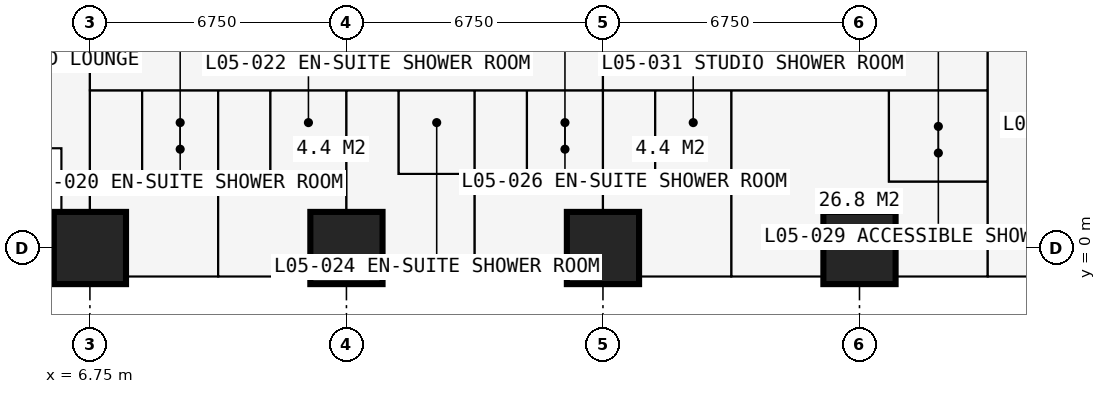
"""IFC4 building model, lengths in metres.
Left out: names, types, materials, properties, quantities, classifications, styles, units other than length and angle.
Written with IfcOpenShell. Run it as: python <this file> out.ifc"""

import sys

from ifc_helpers import new_model, si_unit, direction, frame, frame_2d, origin, origin_2d, place, context, subcontext, project, spatial, rectangle, extrude, element, fill, save


model = new_model("IFC4")
c1 = context("Model", 3, precision=1e-05, world=origin(), true_north=direction((0.0, 1.0)))
c2 = subcontext(c1, "Body", "Model", "MODEL_VIEW")
j1 = project(units=[si_unit("LENGTHUNIT", "METRE"), si_unit("PLANEANGLEUNIT", "RADIAN")], contexts=[c1])
p1 = place(None, origin())
s1 = spatial("IfcSite", under=j1, at=p1, CompositionType="ELEMENT")
p2 = place(p1, origin())
s2 = spatial("IfcBuilding", under=s1, at=p2, CompositionType="ELEMENT")
p3 = place(p2, frame((0.0, 0.0, 21.6)))
s3 = spatial("IfcBuildingStorey", under=s2, at=p3, CompositionType="ELEMENT", Elevation=21.6)
for number, where, z_axis, x_axis in (
    (1, (6.75, 0.0, 0.0), (0.0, 0.0, 1.0), (1.0, 0.0, 0.0)),
    (2, (13.5, 0.0, 0.0), (0.0, 0.0, 1.0), (1.0, 0.0, 0.0)),
    (3, (20.25, 0.0, 0.0), (0.0, 0.0, 1.0), (1.0, 0.0, 0.0)),
    (4, (27.0, 0.0, 0.0), (0.0, 0.0, 1.0), (1.0, 0.0, 0.0)),
):
    element("IfcColumn", number, at=place(p3, frame(where, z_axis=z_axis, x_axis=x_axis)), inside=s3, PredefinedType="COLUMN", context=c2, shape_type="SweptSolid", body=[
        extrude(rectangle(XDim=1.9, YDim=1.9, at=origin_2d()), origin(), (0.0, 0.0, 1.0), 3.6),
    ])
p4 = place(p3, frame((2.625, 2.625, 0.0), z_axis=(0.0, 0.0, 1.0), x_axis=(1.0, 0.0, 0.0)))
e5 = element("IfcWall", 5, at=p4, inside=s3, PredefinedType="SOLIDWALL", context=c2, shape_type="SweptSolid", body=[
    extrude(rectangle(XDim=3.375, YDim=0.3, at=frame_2d((1.688, 0.0))), origin(), (0.0, 0.0, 1.0), 3.375),
])
p5 = place(p4, frame((0.788, 0.0, 0.6)))
e6 = element("IfcOpeningElement", 6, at=p5, cuts=e5, PredefinedType="OPENING", context=c2, shape_type="SweptSolid", body=[
    extrude(rectangle(XDim=1.8, YDim=2.1, at=frame_2d((0.9, 1.05))), frame((0.0, 0.16, 0.0), z_axis=(0.0, -1.0, 0.0), x_axis=(1.0, 0.0, 0.0)), (0.0, 0.0, 1.0), 0.32),
])
p6 = place(p3, frame((6.0, 2.625, 0.0), z_axis=(0.0, 0.0, 1.0), x_axis=(0.0, -1.0, 0.0)))
e7 = element("IfcWall", 7, at=p6, inside=s3, PredefinedType="SOLIDWALL", context=c2, shape_type="SweptSolid", body=[
    extrude(rectangle(XDim=3.375, YDim=0.3, at=frame_2d((1.688, 0.0))), origin(), (0.0, 0.0, 1.0), 3.375),
])
p7 = place(p6, frame((0.317, 0.0, 0.9)))
e8 = element("IfcOpeningElement", 8, at=p7, cuts=e7, PredefinedType="OPENING", context=c2, shape_type="SweptSolid", body=[
    extrude(rectangle(XDim=1.2, YDim=1.8, at=frame_2d((0.6, 0.9))), frame((0.0, 0.16, 0.0), z_axis=(0.0, -1.0, 0.0), x_axis=(1.0, 0.0, 0.0)), (0.0, 0.0, 1.0), 0.32),
])
p8 = place(p3, frame((27.0, -0.75, 0.0), z_axis=(0.0, 0.0, 1.0), x_axis=(-1.0, 0.0, 0.0)))
e9 = element("IfcWall", 9, at=p8, inside=s3, PredefinedType="SOLIDWALL", context=c2, shape_type="SweptSolid", body=[
    extrude(rectangle(XDim=6.75, YDim=0.15, at=frame_2d((3.375, 0.0))), origin(), (0.0, 0.0, 1.0), 3.375),
])
p9 = place(p8, frame((0.996, 0.0, 0.0)))
e10 = element("IfcOpeningElement", 10, at=p9, cuts=e9, PredefinedType="OPENING", context=c2, shape_type="SweptSolid", body=[
    extrude(rectangle(XDim=1.0, YDim=2.2, at=frame_2d((0.5, 1.1))), frame((0.0, 0.085, 0.0), z_axis=(0.0, -1.0, 0.0), x_axis=(1.0, 0.0, 0.0)), (0.0, 0.0, 1.0), 0.17),
])
p10 = place(p8, frame((2.042, 0.0, 0.9)))
e11 = element("IfcOpeningElement", 11, at=p10, cuts=e9, PredefinedType="OPENING", context=c2, shape_type="SweptSolid", body=[
    extrude(rectangle(XDim=1.2, YDim=1.8, at=frame_2d((0.6, 0.9))), frame((0.0, 0.085, 0.0), z_axis=(0.0, -1.0, 0.0), x_axis=(1.0, 0.0, 0.0)), (0.0, 0.0, 1.0), 0.17),
])
p11 = place(p8, frame((4.754, 0.0, 0.0)))
e12 = element("IfcOpeningElement", 12, at=p11, cuts=e9, PredefinedType="OPENING", context=c2, shape_type="SweptSolid", body=[
    extrude(rectangle(XDim=1.0, YDim=2.2, at=frame_2d((0.5, 1.1))), frame((0.0, 0.085, 0.0), z_axis=(0.0, -1.0, 0.0), x_axis=(1.0, 0.0, 0.0)), (0.0, 0.0, 1.0), 0.17),
])
p12 = place(p8, frame((3.508, 0.0, 0.9)))
e13 = element("IfcOpeningElement", 13, at=p12, cuts=e9, PredefinedType="OPENING", context=c2, shape_type="SweptSolid", body=[
    extrude(rectangle(XDim=1.2, YDim=1.8, at=frame_2d((0.6, 0.9))), frame((0.0, 0.085, 0.0), z_axis=(0.0, -1.0, 0.0), x_axis=(1.0, 0.0, 0.0)), (0.0, 0.0, 1.0), 0.17),
])
p13 = place(p3, frame((23.625, -0.85, 0.0), z_axis=(0.0, 0.0, 1.0), x_axis=(0.0, -1.0, 0.0)))
e14 = element("IfcWall", 14, at=p13, inside=s3, PredefinedType="USERDEFINED", context=c2, shape_type="SweptSolid", body=[
    extrude(rectangle(XDim=2.2, YDim=1.0, at=frame_2d((1.1, 0.0))), origin(), (0.0, 0.0, 1.0), 0.9),
])
p14 = place(p3, frame((6.75, -0.734, 0.0), z_axis=(0.0, 0.0, 1.0), x_axis=(0.0, 1.0, 0.0)))
e15 = element("IfcWall", 15, at=p14, inside=s3, PredefinedType="PARTITIONING", context=c2, shape_type="SweptSolid", body=[
    extrude(rectangle(XDim=10.859, YDim=0.15, at=frame_2d((5.429, 0.0))), origin(), (0.0, 0.0, 1.0), 2.877),
])
p15 = place(p3, frame((6.75, 4.15, 0.0), z_axis=(0.0, 0.0, 1.0), x_axis=(1.0, 0.0, 0.0)))
e16 = element("IfcWall", 16, at=p15, inside=s3, PredefinedType="PARTITIONING", context=c2, shape_type="SweptSolid", body=[
    extrude(rectangle(XDim=23.625, YDim=0.1, at=frame_2d((11.812, 0.0))), origin(), (0.0, 0.0, 1.0), 3.375),
])
p16 = place(p15, frame((0.2, 0.0, 0.0)))
e17 = element("IfcOpeningElement", 17, at=p16, cuts=e16, PredefinedType="OPENING", context=c2, shape_type="SweptSolid", body=[
    extrude(rectangle(XDim=0.95, YDim=2.2, at=frame_2d((0.475, 1.1))), frame((0.0, 0.06, 0.0), z_axis=(0.0, -1.0, 0.0), x_axis=(1.0, 0.0, 0.0)), (0.0, 0.0, 1.0), 0.12),
])
p17 = place(p15, frame((3.625, 0.0, 0.0)))
e18 = element("IfcOpeningElement", 18, at=p17, cuts=e16, PredefinedType="OPENING", context=c2, shape_type="SweptSolid", body=[
    extrude(rectangle(XDim=0.95, YDim=2.2, at=frame_2d((0.475, 1.1))), frame((0.0, 0.06, 0.0), z_axis=(0.0, -1.0, 0.0), x_axis=(1.0, 0.0, 0.0)), (0.0, 0.0, 1.0), 0.12),
])
p18 = place(p15, frame((7.0, 0.0, 0.0)))
e19 = element("IfcOpeningElement", 19, at=p18, cuts=e16, PredefinedType="OPENING", context=c2, shape_type="SweptSolid", body=[
    extrude(rectangle(XDim=0.95, YDim=2.2, at=frame_2d((0.475, 1.1))), frame((0.0, 0.06, 0.0), z_axis=(0.0, -1.0, 0.0), x_axis=(1.0, 0.0, 0.0)), (0.0, 0.0, 1.0), 0.12),
])
p19 = place(p15, frame((10.375, 0.0, 0.0)))
e20 = element("IfcOpeningElement", 20, at=p19, cuts=e16, PredefinedType="OPENING", context=c2, shape_type="SweptSolid", body=[
    extrude(rectangle(XDim=0.95, YDim=2.2, at=frame_2d((0.475, 1.1))), frame((0.0, 0.06, 0.0), z_axis=(0.0, -1.0, 0.0), x_axis=(1.0, 0.0, 0.0)), (0.0, 0.0, 1.0), 0.12),
])
p20 = place(p15, frame((18.475, 0.0, 0.0)))
e21 = element("IfcOpeningElement", 21, at=p20, cuts=e16, PredefinedType="OPENING", context=c2, shape_type="SweptSolid", body=[
    extrude(rectangle(XDim=0.95, YDim=2.2, at=frame_2d((0.475, 1.1))), frame((0.0, 0.06, 0.0), z_axis=(0.0, -1.0, 0.0), x_axis=(1.0, 0.0, 0.0)), (0.0, 0.0, 1.0), 0.12),
])
p21 = place(p15, frame((13.7, 0.0, 0.0)))
e22 = element("IfcOpeningElement", 22, at=p21, cuts=e16, PredefinedType="OPENING", context=c2, shape_type="SweptSolid", body=[
    extrude(rectangle(XDim=0.95, YDim=2.2, at=frame_2d((0.475, 1.1))), frame((0.0, 0.06, 0.0), z_axis=(0.0, -1.0, 0.0), x_axis=(1.0, 0.0, 0.0)), (0.0, 0.0, 1.0), 0.12),
])
p22 = place(p3, frame((8.125, 1.95, 0.0), z_axis=(0.0, 0.0, 1.0), x_axis=(0.0, 1.0, 0.0)))
e23 = element("IfcWall", 23, at=p22, inside=s3, PredefinedType="PARTITIONING", context=c2, shape_type="SweptSolid", body=[
    extrude(rectangle(XDim=2.2, YDim=0.1, at=frame_2d((1.1, 0.0))), origin(), (0.0, 0.0, 1.0), 3.375),
])
p23 = place(p22, frame((0.65, 0.0, 0.0)))
e24 = element("IfcOpeningElement", 24, at=p23, cuts=e23, PredefinedType="OPENING", context=c2, shape_type="SweptSolid", body=[
    extrude(rectangle(XDim=0.9, YDim=2.2, at=frame_2d((0.45, 1.1))), frame((0.0, 0.06, 0.0), z_axis=(0.0, -1.0, 0.0), x_axis=(1.0, 0.0, 0.0)), (0.0, 0.0, 1.0), 0.12),
])
p24 = place(p3, frame((8.125, 1.95, 0.0), z_axis=(0.0, 0.0, 1.0), x_axis=(1.0, 0.0, 0.0)))
e25 = element("IfcWall", 25, at=p24, inside=s3, PredefinedType="PARTITIONING", context=c2, shape_type="SweptSolid", body=[
    extrude(rectangle(XDim=2.0, YDim=0.1, at=frame_2d((1.0, 0.0))), origin(), (0.0, 0.0, 1.0), 3.375),
])
p25 = place(p3, frame((10.125, -0.734, 0.0), z_axis=(0.0, 0.0, 1.0), x_axis=(0.0, 1.0, 0.0)))
e26 = element("IfcWall", 26, at=p25, inside=s3, PredefinedType="PARTITIONING", context=c2, shape_type="SweptSolid", body=[
    extrude(rectangle(XDim=4.884, YDim=0.175, at=frame_2d((2.442, 0.0))), origin(), (0.0, 0.0, 1.0), 3.375),
])
p26 = place(p3, frame((11.5, 1.95, 0.0), z_axis=(0.0, 0.0, 1.0), x_axis=(0.0, 1.0, 0.0)))
e27 = element("IfcWall", 27, at=p26, inside=s3, PredefinedType="PARTITIONING", context=c2, shape_type="SweptSolid", body=[
    extrude(rectangle(XDim=2.2, YDim=0.1, at=frame_2d((1.1, 0.0))), origin(), (0.0, 0.0, 1.0), 3.375),
])
p27 = place(p26, frame((0.65, 0.0, 0.0)))
e28 = element("IfcOpeningElement", 28, at=p27, cuts=e27, PredefinedType="OPENING", context=c2, shape_type="SweptSolid", body=[
    extrude(rectangle(XDim=0.9, YDim=2.2, at=frame_2d((0.45, 1.1))), frame((0.0, 0.06, 0.0), z_axis=(0.0, -1.0, 0.0), x_axis=(1.0, 0.0, 0.0)), (0.0, 0.0, 1.0), 0.12),
])
p28 = place(p3, frame((11.5, 1.95, 0.0), z_axis=(0.0, 0.0, 1.0), x_axis=(1.0, 0.0, 0.0)))
e29 = element("IfcWall", 29, at=p28, inside=s3, PredefinedType="PARTITIONING", context=c2, shape_type="SweptSolid", body=[
    extrude(rectangle(XDim=2.0, YDim=0.1, at=frame_2d((1.0, 0.0))), origin(), (0.0, 0.0, 1.0), 3.375),
])
p29 = place(p3, frame((13.5, -0.734, 0.0), z_axis=(0.0, 0.0, 1.0), x_axis=(0.0, 1.0, 0.0)))
e30 = element("IfcWall", 30, at=p29, inside=s3, PredefinedType="PARTITIONING", context=c2, shape_type="SweptSolid", body=[
    extrude(rectangle(XDim=4.884, YDim=0.175, at=frame_2d((2.442, 0.0))), origin(), (0.0, 0.0, 1.0), 2.61),
])
p30 = place(p3, frame((14.875, 1.95, 0.0), z_axis=(0.0, 0.0, 1.0), x_axis=(0.0, 1.0, 0.0)))
e31 = element("IfcWall", 31, at=p30, inside=s3, PredefinedType="PARTITIONING", context=c2, shape_type="SweptSolid", body=[
    extrude(rectangle(XDim=2.2, YDim=0.1, at=frame_2d((1.1, 0.0))), origin(), (0.0, 0.0, 1.0), 3.375),
])
p31 = place(p30, frame((0.65, 0.0, 0.0)))
e32 = element("IfcOpeningElement", 32, at=p31, cuts=e31, PredefinedType="OPENING", context=c2, shape_type="SweptSolid", body=[
    extrude(rectangle(XDim=0.9, YDim=2.2, at=frame_2d((0.45, 1.1))), frame((0.0, 0.06, 0.0), z_axis=(0.0, -1.0, 0.0), x_axis=(1.0, 0.0, 0.0)), (0.0, 0.0, 1.0), 0.12),
])
p32 = place(p3, frame((14.875, 1.95, 0.0), z_axis=(0.0, 0.0, 1.0), x_axis=(1.0, 0.0, 0.0)))
e33 = element("IfcWall", 33, at=p32, inside=s3, PredefinedType="PARTITIONING", context=c2, shape_type="SweptSolid", body=[
    extrude(rectangle(XDim=2.0, YDim=0.1, at=frame_2d((1.0, 0.0))), origin(), (0.0, 0.0, 1.0), 3.375),
])
p33 = place(p3, frame((16.875, -0.734, 0.0), z_axis=(0.0, 0.0, 1.0), x_axis=(0.0, 1.0, 0.0)))
e34 = element("IfcWall", 34, at=p33, inside=s3, PredefinedType="PARTITIONING", context=c2, shape_type="SweptSolid", body=[
    extrude(rectangle(XDim=4.884, YDim=0.175, at=frame_2d((2.442, 0.0))), origin(), (0.0, 0.0, 1.0), 3.375),
])
p34 = place(p3, frame((18.25, 1.95, 0.0), z_axis=(0.0, 0.0, 1.0), x_axis=(0.0, 1.0, 0.0)))
e35 = element("IfcWall", 35, at=p34, inside=s3, PredefinedType="PARTITIONING", context=c2, shape_type="SweptSolid", body=[
    extrude(rectangle(XDim=2.2, YDim=0.1, at=frame_2d((1.1, 0.0))), origin(), (0.0, 0.0, 1.0), 3.375),
])
p35 = place(p34, frame((0.65, 0.0, 0.0)))
e36 = element("IfcOpeningElement", 36, at=p35, cuts=e35, PredefinedType="OPENING", context=c2, shape_type="SweptSolid", body=[
    extrude(rectangle(XDim=0.9, YDim=2.2, at=frame_2d((0.45, 1.1))), frame((0.0, 0.06, 0.0), z_axis=(0.0, -1.0, 0.0), x_axis=(1.0, 0.0, 0.0)), (0.0, 0.0, 1.0), 0.12),
])
p36 = place(p3, frame((18.25, 1.95, 0.0), z_axis=(0.0, 0.0, 1.0), x_axis=(1.0, 0.0, 0.0)))
e37 = element("IfcWall", 37, at=p36, inside=s3, PredefinedType="PARTITIONING", context=c2, shape_type="SweptSolid", body=[
    extrude(rectangle(XDim=2.0, YDim=0.1, at=frame_2d((1.0, 0.0))), origin(), (0.0, 0.0, 1.0), 3.375),
])
p37 = place(p3, frame((20.25, -0.734, 0.0), z_axis=(0.0, 0.0, 1.0), x_axis=(0.0, 1.0, 0.0)))
e38 = element("IfcWall", 38, at=p37, inside=s3, PredefinedType="PARTITIONING", context=c2, shape_type="SweptSolid", body=[
    extrude(rectangle(XDim=12.034, YDim=0.15, at=frame_2d((6.017, 0.0))), origin(), (0.0, 0.0, 1.0), 2.61),
])
p38 = place(p3, frame((21.625, 1.95, 0.0), z_axis=(0.0, 0.0, 1.0), x_axis=(0.0, 1.0, 0.0)))
e39 = element("IfcWall", 39, at=p38, inside=s3, PredefinedType="PARTITIONING", context=c2, shape_type="SweptSolid", body=[
    extrude(rectangle(XDim=2.2, YDim=0.1, at=frame_2d((1.1, 0.0))), origin(), (0.0, 0.0, 1.0), 3.375),
])
p39 = place(p3, frame((21.625, 1.95, 0.0), z_axis=(0.0, 0.0, 1.0), x_axis=(1.0, 0.0, 0.0)))
e40 = element("IfcWall", 40, at=p39, inside=s3, PredefinedType="PARTITIONING", context=c2, shape_type="SweptSolid", body=[
    extrude(rectangle(XDim=2.0, YDim=0.1, at=frame_2d((1.0, 0.0))), origin(), (0.0, 0.0, 1.0), 3.375),
])
p40 = place(p3, frame((23.625, -0.734, 0.0), z_axis=(0.0, 0.0, 1.0), x_axis=(0.0, 1.0, 0.0)))
e41 = element("IfcWall", 41, at=p40, inside=s3, PredefinedType="PARTITIONING", context=c2, shape_type="SweptSolid", body=[
    extrude(rectangle(XDim=4.884, YDim=0.175, at=frame_2d((2.442, 0.0))), origin(), (0.0, 0.0, 1.0), 3.375),
])
p41 = place(p40, frame((3.334, 0.0, 0.0)))
e42 = element("IfcOpeningElement", 42, at=p41, cuts=e41, PredefinedType="OPENING", context=c2, shape_type="SweptSolid", body=[
    extrude(rectangle(XDim=0.9, YDim=2.2, at=frame_2d((0.45, 1.1))), frame((0.0, 0.097, 0.0), z_axis=(0.0, -1.0, 0.0), x_axis=(1.0, 0.0, 0.0)), (0.0, 0.0, 1.0), 0.195),
])
p42 = place(p3, frame((27.775, 1.75, 0.0), z_axis=(0.0, 0.0, 1.0), x_axis=(0.0, 1.0, 0.0)))
e43 = element("IfcWall", 43, at=p42, inside=s3, PredefinedType="PARTITIONING", context=c2, shape_type="SweptSolid", body=[
    extrude(rectangle(XDim=2.4, YDim=0.1, at=frame_2d((1.2, 0.0))), origin(), (0.0, 0.0, 1.0), 3.375),
])
p43 = place(p3, frame((27.775, 1.75, 0.0), z_axis=(0.0, 0.0, 1.0), x_axis=(1.0, 0.0, 0.0)))
e44 = element("IfcWall", 44, at=p43, inside=s3, PredefinedType="PARTITIONING", context=c2, shape_type="SweptSolid", body=[
    extrude(rectangle(XDim=2.6, YDim=0.1, at=frame_2d((1.3, 0.0))), origin(), (0.0, 0.0, 1.0), 3.375),
])
p44 = place(p43, frame((0.85, 0.0, 0.0)))
e45 = element("IfcOpeningElement", 45, at=p44, cuts=e44, PredefinedType="OPENING", context=c2, shape_type="SweptSolid", body=[
    extrude(rectangle(XDim=0.9, YDim=2.2, at=frame_2d((0.45, 1.1))), frame((0.0, 0.06, 0.0), z_axis=(0.0, -1.0, 0.0), x_axis=(1.0, 0.0, 0.0)), (0.0, 0.0, 1.0), 0.12),
])
p45 = place(p3, frame((30.375, -0.734, 0.0), z_axis=(0.0, 0.0, 1.0), x_axis=(0.0, 1.0, 0.0)))
e46 = element("IfcWall", 46, at=p45, inside=s3, PredefinedType="PARTITIONING", context=c2, shape_type="SweptSolid", body=[
    extrude(rectangle(XDim=12.034, YDim=0.15, at=frame_2d((6.017, 0.0))), origin(), (0.0, 0.0, 1.0), 3.375),
])
p46 = place(p7, origin())
e47 = element("IfcWindow", 47, at=p46, inside=s3, PartitioningType="SINGLE_PANEL", PredefinedType="WINDOW", context=c2, shape_type="SweptSolid", body=[
    extrude(rectangle(XDim=1.2, YDim=1.8, at=frame_2d((0.6, 0.9))), frame((0.0, 0.03, 0.0), z_axis=(0.0, -1.0, 0.0), x_axis=(1.0, 0.0, 0.0)), (0.0, 0.0, 1.0), 0.06),
])
fill(e8, e47)
p47 = place(p9, origin())
e48 = element("IfcDoor", 48, at=p47, inside=s3, OperationType="SINGLE_SWING_LEFT", PredefinedType="DOOR", context=c2, shape_type="SweptSolid", body=[
    extrude(rectangle(XDim=1.0, YDim=2.2, at=frame_2d((0.5, 1.1))), frame((0.0, 0.025, 0.0), z_axis=(0.0, -1.0, 0.0), x_axis=(1.0, 0.0, 0.0)), (0.0, 0.0, 1.0), 0.05),
])
fill(e10, e48)
p48 = place(p10, origin())
e49 = element("IfcWindow", 49, at=p48, inside=s3, PartitioningType="SINGLE_PANEL", PredefinedType="WINDOW", context=c2, shape_type="SweptSolid", body=[
    extrude(rectangle(XDim=1.2, YDim=1.8, at=frame_2d((0.6, 0.9))), frame((0.0, 0.03, 0.0), z_axis=(0.0, -1.0, 0.0), x_axis=(1.0, 0.0, 0.0)), (0.0, 0.0, 1.0), 0.06),
])
fill(e11, e49)
p49 = place(p11, origin())
e50 = element("IfcDoor", 50, at=p49, inside=s3, OperationType="SINGLE_SWING_RIGHT", PredefinedType="DOOR", context=c2, shape_type="SweptSolid", body=[
    extrude(rectangle(XDim=1.0, YDim=2.2, at=frame_2d((0.5, 1.1))), frame((0.0, 0.025, 0.0), z_axis=(0.0, -1.0, 0.0), x_axis=(1.0, 0.0, 0.0)), (0.0, 0.0, 1.0), 0.05),
])
fill(e12, e50)
p50 = place(p12, origin())
e51 = element("IfcWindow", 51, at=p50, inside=s3, PartitioningType="SINGLE_PANEL", PredefinedType="WINDOW", context=c2, shape_type="SweptSolid", body=[
    extrude(rectangle(XDim=1.2, YDim=1.8, at=frame_2d((0.6, 0.9))), frame((0.0, 0.03, 0.0), z_axis=(0.0, -1.0, 0.0), x_axis=(1.0, 0.0, 0.0)), (0.0, 0.0, 1.0), 0.06),
])
fill(e13, e51)
p51 = place(p16, origin())
e52 = element("IfcDoor", 52, at=p51, inside=s3, OperationType="SINGLE_SWING_LEFT", PredefinedType="DOOR", context=c2, shape_type="SweptSolid", body=[
    extrude(rectangle(XDim=0.95, YDim=2.2, at=frame_2d((0.475, 1.1))), frame((0.0, 0.025, 0.0), z_axis=(0.0, -1.0, 0.0), x_axis=(1.0, 0.0, 0.0)), (0.0, 0.0, 1.0), 0.05),
])
fill(e17, e52)
p52 = place(p23, origin())
e53 = element("IfcDoor", 53, at=p52, inside=s3, OperationType="SINGLE_SWING_RIGHT", PredefinedType="DOOR", context=c2, shape_type="SweptSolid", body=[
    extrude(rectangle(XDim=0.9, YDim=2.2, at=frame_2d((0.45, 1.1))), frame((0.0, 0.025, 0.0), z_axis=(0.0, -1.0, 0.0), x_axis=(1.0, 0.0, 0.0)), (0.0, 0.0, 1.0), 0.05),
])
fill(e24, e53)
p53 = place(p17, origin())
e54 = element("IfcDoor", 54, at=p53, inside=s3, OperationType="SINGLE_SWING_LEFT", PredefinedType="DOOR", context=c2, shape_type="SweptSolid", body=[
    extrude(rectangle(XDim=0.95, YDim=2.2, at=frame_2d((0.475, 1.1))), frame((0.0, 0.025, 0.0), z_axis=(0.0, -1.0, 0.0), x_axis=(1.0, 0.0, 0.0)), (0.0, 0.0, 1.0), 0.05),
])
fill(e18, e54)
p54 = place(p27, origin())
e55 = element("IfcDoor", 55, at=p54, inside=s3, OperationType="SINGLE_SWING_RIGHT", PredefinedType="DOOR", context=c2, shape_type="SweptSolid", body=[
    extrude(rectangle(XDim=0.9, YDim=2.2, at=frame_2d((0.45, 1.1))), frame((0.0, 0.025, 0.0), z_axis=(0.0, -1.0, 0.0), x_axis=(1.0, 0.0, 0.0)), (0.0, 0.0, 1.0), 0.05),
])
fill(e28, e55)
p55 = place(p18, origin())
e56 = element("IfcDoor", 56, at=p55, inside=s3, OperationType="SINGLE_SWING_LEFT", PredefinedType="DOOR", context=c2, shape_type="SweptSolid", body=[
    extrude(rectangle(XDim=0.95, YDim=2.2, at=frame_2d((0.475, 1.1))), frame((0.0, 0.025, 0.0), z_axis=(0.0, -1.0, 0.0), x_axis=(1.0, 0.0, 0.0)), (0.0, 0.0, 1.0), 0.05),
])
fill(e19, e56)
p56 = place(p31, origin())
e57 = element("IfcDoor", 57, at=p56, inside=s3, OperationType="SINGLE_SWING_RIGHT", PredefinedType="DOOR", context=c2, shape_type="SweptSolid", body=[
    extrude(rectangle(XDim=0.9, YDim=2.2, at=frame_2d((0.45, 1.1))), frame((0.0, 0.025, 0.0), z_axis=(0.0, -1.0, 0.0), x_axis=(1.0, 0.0, 0.0)), (0.0, 0.0, 1.0), 0.05),
])
fill(e32, e57)
p57 = place(p19, origin())
e58 = element("IfcDoor", 58, at=p57, inside=s3, OperationType="SINGLE_SWING_LEFT", PredefinedType="DOOR", context=c2, shape_type="SweptSolid", body=[
    extrude(rectangle(XDim=0.95, YDim=2.2, at=frame_2d((0.475, 1.1))), frame((0.0, 0.025, 0.0), z_axis=(0.0, -1.0, 0.0), x_axis=(1.0, 0.0, 0.0)), (0.0, 0.0, 1.0), 0.05),
])
fill(e20, e58)
p58 = place(p35, origin())
e59 = element("IfcDoor", 59, at=p58, inside=s3, OperationType="SINGLE_SWING_RIGHT", PredefinedType="DOOR", context=c2, shape_type="SweptSolid", body=[
    extrude(rectangle(XDim=0.9, YDim=2.2, at=frame_2d((0.45, 1.1))), frame((0.0, 0.025, 0.0), z_axis=(0.0, -1.0, 0.0), x_axis=(1.0, 0.0, 0.0)), (0.0, 0.0, 1.0), 0.05),
])
fill(e36, e59)
p59 = place(p20, origin())
e60 = element("IfcDoor", 60, at=p59, inside=s3, OperationType="SINGLE_SWING_LEFT", PredefinedType="DOOR", context=c2, shape_type="SweptSolid", body=[
    extrude(rectangle(XDim=0.95, YDim=2.2, at=frame_2d((0.475, 1.1))), frame((0.0, 0.025, 0.0), z_axis=(0.0, -1.0, 0.0), x_axis=(1.0, 0.0, 0.0)), (0.0, 0.0, 1.0), 0.05),
])
fill(e21, e60)
p60 = place(p44, origin())
e61 = element("IfcDoor", 61, at=p60, inside=s3, OperationType="SINGLE_SWING_RIGHT", PredefinedType="DOOR", context=c2, shape_type="SweptSolid", body=[
    extrude(rectangle(XDim=0.9, YDim=2.2, at=frame_2d((0.45, 1.1))), frame((0.0, 0.025, 0.0), z_axis=(0.0, -1.0, 0.0), x_axis=(1.0, 0.0, 0.0)), (0.0, 0.0, 1.0), 0.05),
])
fill(e45, e61)
p61 = place(p21, origin())
e62 = element("IfcDoor", 62, at=p61, inside=s3, OperationType="SINGLE_SWING_LEFT", PredefinedType="DOOR", context=c2, shape_type="SweptSolid", body=[
    extrude(rectangle(XDim=0.95, YDim=2.2, at=frame_2d((0.475, 1.1))), frame((0.0, 0.025, 0.0), z_axis=(0.0, -1.0, 0.0), x_axis=(1.0, 0.0, 0.0)), (0.0, 0.0, 1.0), 0.05),
])
fill(e22, e62)
p62 = place(p41, origin())
e63 = element("IfcDoor", 63, at=p62, inside=s3, OperationType="SINGLE_SWING_RIGHT", PredefinedType="DOOR", context=c2, shape_type="SweptSolid", body=[
    extrude(rectangle(XDim=0.9, YDim=2.2, at=frame_2d((0.45, 1.1))), frame((0.0, 0.025, 0.0), z_axis=(0.0, -1.0, 0.0), x_axis=(1.0, 0.0, 0.0)), (0.0, 0.0, 1.0), 0.05),
])
fill(e42, e63)
save(model, sys.argv[1])
